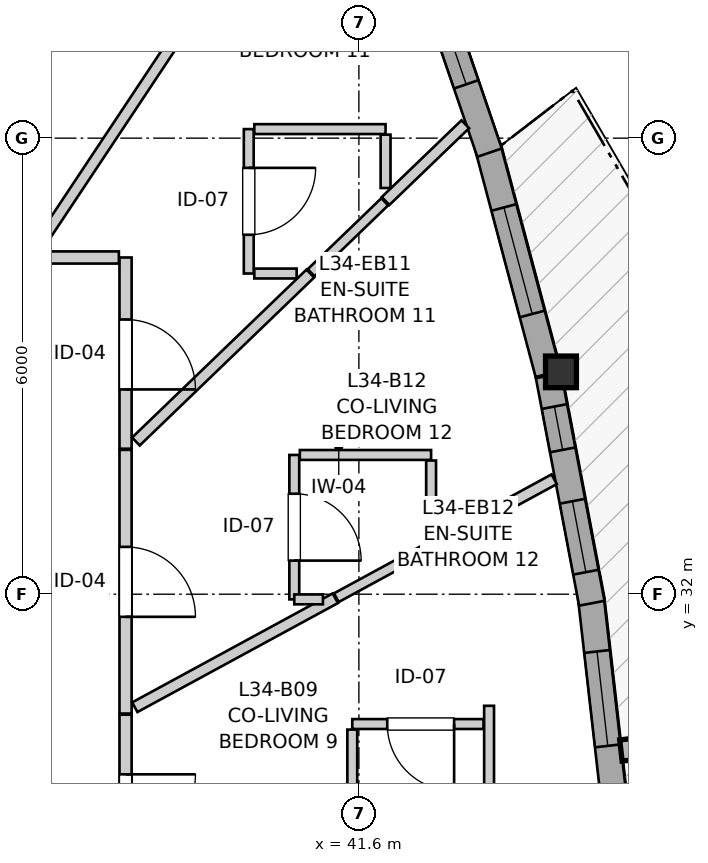
"""IFC4 building model, lengths in metres.
Left out: names, types, materials, properties, quantities, classifications, styles, units other than length and angle.
Written with IfcOpenShell. Run it as: python <this file> out.ifc"""

import sys

from ifc_helpers import new_model, si_unit, direction, frame, frame_2d, origin, origin_2d, place, context, subcontext, project, spatial, rectangle, i_section, extrude, source, transform, mapped, element, fill, save


model = new_model("IFC4")
c1 = context("Model", 3, precision=1e-05, world=origin(), true_north=direction((0.0, 1.0)))
c2 = subcontext(c1, "Body", "Model", "MODEL_VIEW")
j1 = project(units=[si_unit("LENGTHUNIT", "METRE"), si_unit("PLANEANGLEUNIT", "RADIAN")], contexts=[c1])
p1 = place(None, origin())
s1 = spatial("IfcSite", under=j1, at=p1, CompositionType="ELEMENT")
p2 = place(p1, origin())
s2 = spatial("IfcBuilding", under=s1, at=p2, CompositionType="ELEMENT")
p3 = place(p2, frame((0.0, 0.0, 115.2)))
s3 = spatial("IfcBuildingStorey", under=s2, at=p3, CompositionType="ELEMENT", Elevation=115.2)
m1 = source(origin(), c2, "Body", "SweptSolid", [
    extrude(i_section(OverallWidth=0.406, OverallDepth=0.416, WebThickness=0.027, FlangeThickness=0.044, FilletRadius=0.015, at=origin_2d()), origin(), (0.0, 0.0, 1.0), 2.95),
])
p4 = place(p3, frame((44.259, 34.925, 0.0), z_axis=(0.0, 0.0, 1.0), x_axis=(1.0, 0.0, 0.0)))
e1 = element("IfcColumn", 1, at=p4, inside=s3, PredefinedType="PILASTER", context=c2, shape_type="MappedRepresentation", body=[
    mapped(m1, transform((0.0, 0.0, 0.0), x_axis=(1.0, 0.0, 0.0), y_axis=(0.0, 1.0, 0.0), z_axis=(0.0, 0.0, 1.0), scale=1.0)),
])
p5 = place(p3, frame((44.968, 29.184, 0.0), z_axis=(0.0, 0.0, 1.0), x_axis=(-0.113251751131, 0.993566324342, 0.0)))
e2 = element("IfcWall", 2, at=p5, inside=s3, PredefinedType="SOLIDWALL", context=c2, shape_type="SweptSolid", body=[
    extrude(rectangle(XDim=2.802, YDim=0.34, at=frame_2d((1.401, 0.0))), origin(), (0.0, 0.0, 1.0), 2.48),
])
p6 = place(p5, frame((0.826, 0.0, 0.82)))
e3 = element("IfcOpeningElement", 3, at=p6, cuts=e2, PredefinedType="OPENING", context=c2, shape_type="SweptSolid", body=[
    extrude(rectangle(XDim=1.25, YDim=1.35, at=frame_2d((0.625, 0.675))), frame((0.0, 0.18, 0.0), z_axis=(0.0, -1.0, 0.0), x_axis=(1.0, 0.0, 0.0)), (0.0, 0.0, 1.0), 0.36),
])
p7 = place(p3, frame((44.664, 31.881, 0.0), z_axis=(0.0, 0.0, 1.0), x_axis=(-0.18665909876, 0.982424745642, 0.0)))
e4 = element("IfcWall", 4, at=p7, inside=s3, PredefinedType="SOLIDWALL", context=c2, shape_type="SweptSolid", body=[
    extrude(rectangle(XDim=3.046, YDim=0.34, at=frame_2d((1.523, 0.0))), origin(), (0.0, 0.0, 1.0), 2.48),
])
p8 = place(p7, frame((0.416, 0.0, 0.82)))
e5 = element("IfcOpeningElement", 5, at=p8, cuts=e4, PredefinedType="OPENING", context=c2, shape_type="SweptSolid", body=[
    extrude(rectangle(XDim=0.95, YDim=1.35, at=frame_2d((0.475, 0.675))), frame((0.0, 0.18, 0.0), z_axis=(0.0, -1.0, 0.0), x_axis=(1.0, 0.0, 0.0)), (0.0, 0.0, 1.0), 0.36),
])
p9 = place(p7, frame((2.054, 0.0, 0.82)))
e6 = element("IfcOpeningElement", 6, at=p9, cuts=e4, PredefinedType="OPENING", context=c2, shape_type="SweptSolid", body=[
    extrude(rectangle(XDim=0.58, YDim=1.35, at=frame_2d((0.29, 0.675))), frame((0.0, 0.18, 0.0), z_axis=(0.0, -1.0, 0.0), x_axis=(1.0, 0.0, 0.0)), (0.0, 0.0, 1.0), 0.36),
])
p10 = place(p3, frame((44.09, 34.901, 0.0), z_axis=(0.0, 0.0, 1.0), x_axis=(-0.257108087637, 0.966382652613, 0.0)))
e7 = element("IfcWall", 7, at=p10, inside=s3, PredefinedType="SOLIDWALL", context=c2, shape_type="SweptSolid", body=[
    extrude(rectangle(XDim=3.096, YDim=0.34, at=frame_2d((1.548, 0.0))), origin(), (0.0, 0.0, 1.0), 2.48),
])
p11 = place(p10, frame((0.813, 0.0, 0.82)))
e8 = element("IfcOpeningElement", 8, at=p11, cuts=e7, PredefinedType="OPENING", context=c2, shape_type="SweptSolid", body=[
    extrude(rectangle(XDim=1.45, YDim=1.25, at=frame_2d((0.725, 0.625))), frame((0.0, 0.18, 0.0), z_axis=(0.0, -1.0, 0.0), x_axis=(1.0, 0.0, 0.0)), (0.0, 0.0, 1.0), 0.36),
])
p12 = place(p3, frame((43.319, 37.809, 0.0), z_axis=(0.0, 0.0, 1.0), x_axis=(-0.323586371726, 0.946198636669, 0.0)))
e9 = element("IfcWall", 9, at=p12, inside=s3, PredefinedType="SOLIDWALL", context=c2, shape_type="SweptSolid", body=[
    extrude(rectangle(XDim=2.952, YDim=0.34, at=frame_2d((1.476, 0.0))), origin(), (0.0, 0.0, 1.0), 2.48),
])
p13 = place(p12, frame((0.949, 0.0, 0.82)))
e10 = element("IfcOpeningElement", 10, at=p13, cuts=e9, PredefinedType="OPENING", context=c2, shape_type="SweptSolid", body=[
    extrude(rectangle(XDim=1.45, YDim=1.25, at=frame_2d((0.725, 0.625))), frame((0.0, 0.18, 0.0), z_axis=(0.0, -1.0, 0.0), x_axis=(1.0, 0.0, 0.0)), (0.0, 0.0, 1.0), 0.36),
])
p14 = place(p3, frame((38.53, 33.899, 0.0), z_axis=(0.0, 0.0, 1.0), x_axis=(0.0, -1.0, 0.0)))
e11 = element("IfcWall", 11, at=p14, inside=s3, PredefinedType="PARTITIONING", context=c2, shape_type="SweptSolid", body=[
    extrude(rectangle(XDim=3.469, YDim=0.16, at=frame_2d((1.734, 0.0))), origin(), (0.0, 0.0, 1.0), 2.95),
])
p15 = place(p14, frame((1.277, 0.0, 0.0)))
e12 = element("IfcOpeningElement", 12, at=p15, cuts=e11, PredefinedType="OPENING", context=c2, shape_type="SweptSolid", body=[
    extrude(rectangle(XDim=0.92, YDim=2.1, at=frame_2d((0.46, 1.05))), frame((0.0, 0.09, 0.0), z_axis=(0.0, -1.0, 0.0), x_axis=(1.0, 0.0, 0.0)), (0.0, 0.0, 1.0), 0.18),
])
p16 = place(p3, frame((38.53, 30.415, 0.0), z_axis=(0.0, 0.0, 1.0), x_axis=(0.0, -1.0, 0.0)))
e13 = element("IfcWall", 13, at=p16, inside=s3, PredefinedType="PARTITIONING", context=c2, shape_type="SweptSolid", body=[
    extrude(rectangle(XDim=2.536, YDim=0.16, at=frame_2d((1.268, 0.0))), origin(), (0.0, 0.0, 1.0), 2.95),
])
p17 = place(p16, frame((0.784, 0.0, 0.0)))
e14 = element("IfcOpeningElement", 14, at=p17, cuts=e13, PredefinedType="OPENING", context=c2, shape_type="SweptSolid", body=[
    extrude(rectangle(XDim=0.92, YDim=2.1, at=frame_2d((0.46, 1.05))), frame((0.0, 0.09, 0.0), z_axis=(0.0, -1.0, 0.0), x_axis=(1.0, 0.0, 0.0)), (0.0, 0.0, 1.0), 0.18),
])
p18 = place(p3, frame((38.53, 36.43, 0.0), z_axis=(0.0, 0.0, 1.0), x_axis=(0.0, -1.0, 0.0)))
e15 = element("IfcWall", 15, at=p18, inside=s3, PredefinedType="PARTITIONING", context=c2, shape_type="SweptSolid", body=[
    extrude(rectangle(XDim=2.516, YDim=0.16, at=frame_2d((1.258, 0.0))), origin(), (0.0, 0.0, 1.0), 2.588),
])
p19 = place(p18, frame((0.816, 0.0, 0.0)))
e16 = element("IfcOpeningElement", 16, at=p19, cuts=e15, PredefinedType="OPENING", context=c2, shape_type="SweptSolid", body=[
    extrude(rectangle(XDim=0.92, YDim=2.1, at=frame_2d((0.46, 1.05))), frame((0.0, 0.09, 0.0), z_axis=(0.0, -1.0, 0.0), x_axis=(1.0, 0.0, 0.0)), (0.0, 0.0, 1.0), 0.18),
])
p20 = place(p3, frame((40.75, 33.832, 0.0), z_axis=(0.0, 0.0, 1.0), x_axis=(0.0, -1.0, 0.0)))
e17 = element("IfcWall", 17, at=p20, inside=s3, PredefinedType="PARTITIONING", context=c2, shape_type="SweptSolid", body=[
    extrude(rectangle(XDim=1.9, YDim=0.13, at=frame_2d((0.95, 0.0))), origin(), (0.0, 0.0, 1.0), 2.95),
])
p21 = place(p20, frame((0.51, 0.0, 0.0)))
e18 = element("IfcOpeningElement", 18, at=p21, cuts=e17, PredefinedType="OPENING", context=c2, shape_type="SweptSolid", body=[
    extrude(rectangle(XDim=0.88, YDim=2.05, at=frame_2d((0.44, 1.025))), frame((0.0, 0.075, 0.0), z_axis=(0.0, -1.0, 0.0), x_axis=(1.0, 0.0, 0.0)), (0.0, 0.0, 1.0), 0.15),
])
p22 = place(p3, frame((40.151, 38.119, 0.0), z_axis=(0.0, 0.0, 1.0), x_axis=(0.0, -1.0, 0.0)))
e19 = element("IfcWall", 19, at=p22, inside=s3, PredefinedType="PARTITIONING", context=c2, shape_type="SweptSolid", body=[
    extrude(rectangle(XDim=1.9, YDim=0.13, at=frame_2d((0.95, 0.0))), origin(), (0.0, 0.0, 1.0), 2.95),
])
p23 = place(p22, frame((0.51, 0.0, 0.0)))
e20 = element("IfcOpeningElement", 20, at=p23, cuts=e19, PredefinedType="OPENING", context=c2, shape_type="SweptSolid", body=[
    extrude(rectangle(XDim=0.88, YDim=2.05, at=frame_2d((0.44, 1.025))), frame((0.0, 0.075, 0.0), z_axis=(0.0, -1.0, 0.0), x_axis=(1.0, 0.0, 0.0)), (0.0, 0.0, 1.0), 0.15),
])
p24 = place(p3, frame((43.24, 30.292, 0.0), z_axis=(0.0, 0.0, 1.0), x_axis=(-1.0, 0.0, 0.0)))
e21 = element("IfcWall", 21, at=p24, inside=s3, PredefinedType="PARTITIONING", context=c2, shape_type="SweptSolid", body=[
    extrude(rectangle(XDim=1.727, YDim=0.13, at=frame_2d((0.864, 0.0))), origin(), (0.0, 0.0, 1.0), 2.95),
])
p25 = place(p24, frame((0.387, 0.0, 0.0)))
e22 = element("IfcOpeningElement", 22, at=p25, cuts=e21, PredefinedType="OPENING", context=c2, shape_type="SweptSolid", body=[
    extrude(rectangle(XDim=0.88, YDim=2.05, at=frame_2d((0.44, 1.025))), frame((0.0, 0.075, 0.0), z_axis=(0.0, -1.0, 0.0), x_axis=(1.0, 0.0, 0.0)), (0.0, 0.0, 1.0), 0.15),
])
p26 = place(p3, frame((35.191, 36.548, 0.0), z_axis=(0.0, 0.0, 1.0), x_axis=(0.417154036681, 0.908835799075, 0.0)))
e23 = element("IfcWall", 23, at=p26, inside=s3, PredefinedType="PARTITIONING", context=c2, shape_type="SweptSolid", body=[
    extrude(rectangle(XDim=9.949, YDim=0.145, at=frame_2d((4.974, 0.0))), origin(), (0.0, 0.0, 1.0), 2.95),
])
p27 = place(p3, frame((37.366, 36.557, 0.0), z_axis=(0.0, 0.0, 1.0), x_axis=(0.553463679146, 0.832873313215, 0.0)))
e24 = element("IfcWall", 24, at=p27, inside=s3, PredefinedType="PARTITIONING", context=c2, shape_type="SweptSolid", body=[
    extrude(rectangle(XDim=7.704, YDim=0.145, at=frame_2d((3.852, 0.0))), origin(), (0.0, 0.0, 1.0), 2.95),
])
p28 = place(p3, frame((38.666, 34.009, 0.0), z_axis=(0.0, 0.0, 1.0), x_axis=(0.72031454127, 0.693647577402, 0.0)))
e25 = element("IfcWall", 25, at=p28, inside=s3, PredefinedType="PARTITIONING", context=c2, shape_type="SweptSolid", body=[
    extrude(rectangle(XDim=3.186, YDim=0.145, at=frame_2d((1.593, 0.0))), origin(), (0.0, 0.0, 1.0), 2.95),
])
p29 = place(p3, frame((38.652, 30.513, 0.0), z_axis=(0.0, 0.0, 1.0), x_axis=(0.878637115469, 0.47749012484, 0.0)))
e26 = element("IfcWall", 26, at=p29, inside=s3, PredefinedType="PARTITIONING", context=c2, shape_type="SweptSolid", body=[
    extrude(rectangle(XDim=3.003, YDim=0.145, at=frame_2d((1.501, 0.0))), origin(), (0.0, 0.0, 1.0), 2.95),
])
p30 = place(p3, frame((42.535, 32.624, 0.0), z_axis=(0.0, 0.0, 1.0), x_axis=(0.878631690287, 0.477500107669, 0.0)))
e27 = element("IfcWall", 27, at=p30, inside=s3, PredefinedType="PARTITIONING", context=c2, shape_type="SweptSolid", body=[
    extrude(rectangle(XDim=1.861, YDim=0.145, at=frame_2d((0.93, 0.0))), origin(), (0.0, 0.0, 1.0), 2.95),
])
p31 = place(p3, frame((40.224, 38.119, 0.0), z_axis=(0.0, 0.0, 1.0), x_axis=(1.0, 0.0, 0.0)))
e28 = element("IfcWall", 28, at=p31, inside=s3, PredefinedType="PARTITIONING", context=c2, shape_type="SweptSolid", body=[
    extrude(rectangle(XDim=1.727, YDim=0.13, at=frame_2d((0.863, 0.0))), origin(), (0.0, 0.0, 1.0), 2.95),
])
p32 = place(p3, frame((40.823, 33.832, 0.0), z_axis=(0.0, 0.0, 1.0), x_axis=(1.0, 0.0, 0.0)))
e29 = element("IfcWall", 29, at=p32, inside=s3, PredefinedType="PARTITIONING", context=c2, shape_type="SweptSolid", body=[
    extrude(rectangle(XDim=1.727, YDim=0.13, at=frame_2d((0.864, 0.0))), origin(), (0.0, 0.0, 1.0), 2.95),
])
p33 = place(p3, frame((41.513, 28.683, 0.0), z_axis=(0.0, 0.0, 1.0), x_axis=(0.0, 1.0, 0.0)))
e30 = element("IfcWall", 30, at=p33, inside=s3, PredefinedType="PARTITIONING", context=c2, shape_type="SweptSolid", body=[
    extrude(rectangle(XDim=1.536, YDim=0.13, at=frame_2d((0.768, 0.0))), origin(), (0.0, 0.0, 1.0), 2.95),
])
p34 = place(p3, frame((41.951, 37.173, 0.0), z_axis=(0.0, 0.0, 1.0), x_axis=(0.720559112487, 0.693393514111, 0.0)))
e31 = element("IfcWall", 31, at=p34, inside=s3, PredefinedType="PARTITIONING", context=c2, shape_type="SweptSolid", body=[
    extrude(rectangle(XDim=1.456, YDim=0.145, at=frame_2d((0.728, 0.0))), origin(), (0.0, 0.0, 1.0), 2.95),
])
p35 = place(p3, frame((41.303, 31.954, 0.0), z_axis=(0.0, 0.0, 1.0), x_axis=(0.87855387187, 0.477643270885, 0.0)))
e32 = element("IfcWall", 32, at=p35, inside=s3, PredefinedType="PARTITIONING", context=c2, shape_type="SweptSolid", body=[
    extrude(rectangle(XDim=1.387, YDim=0.13, at=frame_2d((0.694, 0.0))), origin(), (0.0, 0.0, 1.0), 2.95),
])
p36 = place(p3, frame((40.972, 36.229, 0.0), z_axis=(0.0, 0.0, 1.0), x_axis=(0.72014550452, 0.693823069896, 0.0)))
e33 = element("IfcWall", 33, at=p36, inside=s3, PredefinedType="PARTITIONING", context=c2, shape_type="SweptSolid", body=[
    extrude(rectangle(XDim=1.345, YDim=0.13, at=frame_2d((0.672, 0.0))), origin(), (0.0, 0.0, 1.0), 2.95),
])
p37 = place(p3, frame((43.313, 28.762, 0.0), z_axis=(0.0, 0.0, 1.0), x_axis=(0.0, 1.0, 0.0)))
e34 = element("IfcWall", 34, at=p37, inside=s3, PredefinedType="PARTITIONING", context=c2, shape_type="SweptSolid", body=[
    extrude(rectangle(XDim=1.77, YDim=0.13, at=frame_2d((0.885, 0.0))), origin(), (0.0, 0.0, 1.0), 2.95),
])
p38 = place(p3, frame((37.463, 36.43, 0.0), z_axis=(0.0, 0.0, 1.0), x_axis=(1.0, 0.0, 0.0)))
e35 = element("IfcWall", 35, at=p38, inside=s3, PredefinedType="PARTITIONING", context=c2, shape_type="SweptSolid", body=[
    extrude(rectangle(XDim=0.979, YDim=0.16, at=frame_2d((0.489, 0.0))), origin(), (0.0, 0.0, 1.0), 2.588),
])
p39 = place(p3, frame((42.55, 32.758, 0.0), z_axis=(0.0, 0.0, 1.0), x_axis=(0.0, 1.0, 0.0)))
e36 = element("IfcWall", 36, at=p39, inside=s3, PredefinedType="PARTITIONING", context=c2, shape_type="SweptSolid", body=[
    extrude(rectangle(XDim=1.001, YDim=0.13, at=frame_2d((0.5, 0.0))), origin(), (0.0, 0.0, 1.0), 2.95),
])
p40 = place(p3, frame((41.951, 37.344, 0.0), z_axis=(0.0, 0.0, 1.0), x_axis=(0.0, 1.0, 0.0)))
e37 = element("IfcWall", 37, at=p40, inside=s3, PredefinedType="PARTITIONING", context=c2, shape_type="SweptSolid", body=[
    extrude(rectangle(XDim=0.702, YDim=0.13, at=frame_2d((0.351, 0.0))), origin(), (0.0, 0.0, 1.0), 2.95),
])
p41 = place(p3, frame((40.224, 36.219, 0.0), z_axis=(0.0, 0.0, 1.0), x_axis=(1.0, 0.0, 0.0)))
e38 = element("IfcWall", 38, at=p41, inside=s3, PredefinedType="PARTITIONING", context=c2, shape_type="SweptSolid", body=[
    extrude(rectangle(XDim=0.557, YDim=0.13, at=frame_2d((0.278, 0.0))), origin(), (0.0, 0.0, 1.0), 2.95),
])
p42 = place(p3, frame((40.75, 31.932, 0.0), z_axis=(0.0, 0.0, 1.0), x_axis=(1.0, 0.0, 0.0)))
e39 = element("IfcWall", 39, at=p42, inside=s3, PredefinedType="PARTITIONING", context=c2, shape_type="SweptSolid", body=[
    extrude(rectangle(XDim=0.377, YDim=0.13, at=frame_2d((0.188, 0.0))), origin(), (0.0, 0.0, 1.0), 2.95),
])
m2 = source(origin(), c2, "Body", "SweptSolid", [
    extrude(rectangle(XDim=1.25, YDim=1.35, at=frame_2d((0.625, 0.675))), frame((0.0, 0.03, 0.0), z_axis=(0.0, -1.0, 0.0), x_axis=(1.0, 0.0, 0.0)), (0.0, 0.0, 1.0), 0.06),
])
p43 = place(p6, origin())
e40 = element("IfcWindow", 40, at=p43, inside=s3, PartitioningType="SINGLE_PANEL", PredefinedType="WINDOW", context=c2, shape_type="MappedRepresentation", body=[
    mapped(m2, transform((0.0, 0.0, 0.0), x_axis=(1.0, 0.0, 0.0), y_axis=(0.0, 1.0, 0.0), z_axis=(0.0, 0.0, 1.0), scale=1.0)),
])
fill(e3, e40)
m3 = source(origin(), c2, "Body", "SweptSolid", [
    extrude(rectangle(XDim=0.95, YDim=1.35, at=frame_2d((0.475, 0.675))), frame((0.0, 0.03, 0.0), z_axis=(0.0, -1.0, 0.0), x_axis=(1.0, 0.0, 0.0)), (0.0, 0.0, 1.0), 0.06),
])
p44 = place(p8, origin())
e41 = element("IfcWindow", 41, at=p44, inside=s3, PartitioningType="SINGLE_PANEL", PredefinedType="WINDOW", context=c2, shape_type="MappedRepresentation", body=[
    mapped(m3, transform((0.0, 0.0, 0.0), x_axis=(1.0, 0.0, 0.0), y_axis=(0.0, 1.0, 0.0), z_axis=(0.0, 0.0, 1.0), scale=1.0)),
])
fill(e5, e41)
m4 = source(origin(), c2, "Body", "SweptSolid", [
    extrude(rectangle(XDim=0.58, YDim=1.35, at=frame_2d((0.29, 0.675))), frame((0.0, 0.03, 0.0), z_axis=(0.0, -1.0, 0.0), x_axis=(1.0, 0.0, 0.0)), (0.0, 0.0, 1.0), 0.06),
])
p45 = place(p9, origin())
e42 = element("IfcWindow", 42, at=p45, inside=s3, PartitioningType="SINGLE_PANEL", PredefinedType="WINDOW", context=c2, shape_type="MappedRepresentation", body=[
    mapped(m4, transform((0.0, 0.0, 0.0), x_axis=(1.0, 0.0, 0.0), y_axis=(0.0, 1.0, 0.0), z_axis=(0.0, 0.0, 1.0), scale=1.0)),
])
fill(e6, e42)
m5 = source(origin(), c2, "Body", "SweptSolid", [
    extrude(rectangle(XDim=1.45, YDim=1.25, at=frame_2d((0.725, 0.625))), frame((0.0, 0.03, 0.0), z_axis=(0.0, -1.0, 0.0), x_axis=(1.0, 0.0, 0.0)), (0.0, 0.0, 1.0), 0.06),
])
p46 = place(p11, origin())
e43 = element("IfcWindow", 43, at=p46, inside=s3, PartitioningType="SINGLE_PANEL", PredefinedType="WINDOW", context=c2, shape_type="MappedRepresentation", body=[
    mapped(m5, transform((0.0, 0.0, 0.0), x_axis=(1.0, 0.0, 0.0), y_axis=(0.0, 1.0, 0.0), z_axis=(0.0, 0.0, 1.0), scale=1.0)),
])
fill(e8, e43)
p47 = place(p13, origin())
e44 = element("IfcWindow", 44, at=p47, inside=s3, PartitioningType="SINGLE_PANEL", PredefinedType="WINDOW", context=c2, shape_type="MappedRepresentation", body=[
    mapped(m5, transform((0.0, 0.0, 0.0), x_axis=(1.0, 0.0, 0.0), y_axis=(0.0, 1.0, 0.0), z_axis=(0.0, 0.0, 1.0), scale=1.0)),
])
fill(e10, e44)
m6 = source(origin(), c2, "Body", "SweptSolid", [
    extrude(rectangle(XDim=0.92, YDim=2.1, at=frame_2d((0.46, 1.05))), frame((0.0, 0.025, 0.0), z_axis=(0.0, -1.0, 0.0), x_axis=(1.0, 0.0, 0.0)), (0.0, 0.0, 1.0), 0.05),
])
p48 = place(p15, origin())
e45 = element("IfcDoor", 45, at=p48, inside=s3, OperationType="SINGLE_SWING_RIGHT", PredefinedType="DOOR", context=c2, shape_type="MappedRepresentation", body=[
    mapped(m6, transform((0.0, 0.0, 0.0), x_axis=(1.0, 0.0, 0.0), y_axis=(0.0, 1.0, 0.0), z_axis=(0.0, 0.0, 1.0), scale=1.0)),
])
fill(e12, e45)
p49 = place(p17, origin())
e46 = element("IfcDoor", 46, at=p49, inside=s3, OperationType="SINGLE_SWING_LEFT", PredefinedType="DOOR", context=c2, shape_type="MappedRepresentation", body=[
    mapped(m6, transform((0.0, 0.0, 0.0), x_axis=(1.0, 0.0, 0.0), y_axis=(0.0, 1.0, 0.0), z_axis=(0.0, 0.0, 1.0), scale=1.0)),
])
fill(e14, e46)
p50 = place(p19, origin())
e47 = element("IfcDoor", 47, at=p50, inside=s3, OperationType="SINGLE_SWING_RIGHT", PredefinedType="DOOR", context=c2, shape_type="MappedRepresentation", body=[
    mapped(m6, transform((0.0, 0.0, 0.0), x_axis=(1.0, 0.0, 0.0), y_axis=(0.0, 1.0, 0.0), z_axis=(0.0, 0.0, 1.0), scale=1.0)),
])
fill(e16, e47)
m7 = source(origin(), c2, "Body", "SweptSolid", [
    extrude(rectangle(XDim=0.88, YDim=2.05, at=frame_2d((0.44, 1.025))), frame((0.0, 0.025, 0.0), z_axis=(0.0, -1.0, 0.0), x_axis=(1.0, 0.0, 0.0)), (0.0, 0.0, 1.0), 0.05),
])
p51 = place(p21, origin())
e48 = element("IfcDoor", 48, at=p51, inside=s3, OperationType="SINGLE_SWING_RIGHT", PredefinedType="DOOR", context=c2, shape_type="MappedRepresentation", body=[
    mapped(m7, transform((0.0, 0.0, 0.0), x_axis=(1.0, 0.0, 0.0), y_axis=(0.0, 1.0, 0.0), z_axis=(0.0, 0.0, 1.0), scale=1.0)),
])
fill(e18, e48)
p52 = place(p23, origin())
e49 = element("IfcDoor", 49, at=p52, inside=s3, OperationType="SINGLE_SWING_LEFT", PredefinedType="DOOR", context=c2, shape_type="MappedRepresentation", body=[
    mapped(m7, transform((0.0, 0.0, 0.0), x_axis=(1.0, 0.0, 0.0), y_axis=(0.0, 1.0, 0.0), z_axis=(0.0, 0.0, 1.0), scale=1.0)),
])
fill(e20, e49)
p53 = place(p25, origin())
e50 = element("IfcDoor", 50, at=p53, inside=s3, OperationType="SINGLE_SWING_LEFT", PredefinedType="DOOR", context=c2, shape_type="MappedRepresentation", body=[
    mapped(m7, transform((0.0, 0.0, 0.0), x_axis=(1.0, 0.0, 0.0), y_axis=(0.0, 1.0, 0.0), z_axis=(0.0, 0.0, 1.0), scale=1.0)),
])
fill(e22, e50)
save(model, sys.argv[1])
